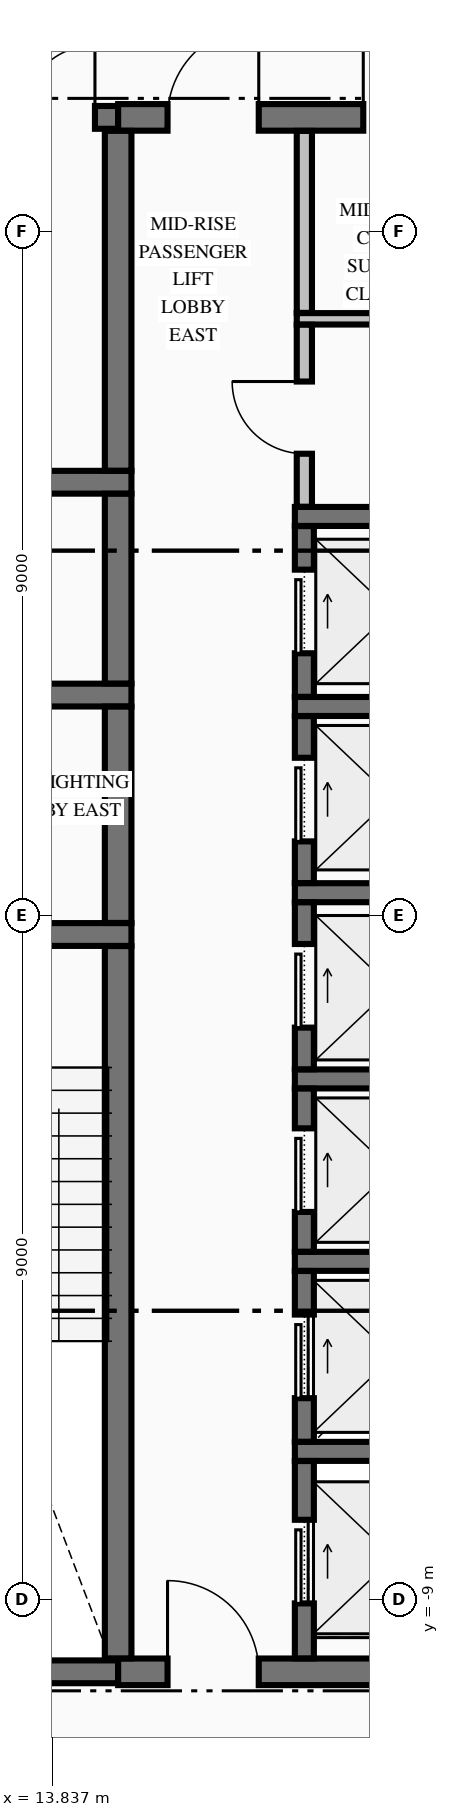
"""IFC4 building model, lengths in metres.
Left out: names, types, materials, properties, quantities, classifications, styles, units other than length and angle.
Written with IfcOpenShell. Run it as: python <this file> out.ifc"""

import sys

from ifc_helpers import new_model, si_unit, direction, frame, frame_2d, origin, place, context, subcontext, project, spatial, rectangle, extrude, element, fill, save


model = new_model("IFC4")
c1 = context("Model", 3, precision=1e-05, world=origin(), true_north=direction((0.0, 1.0)))
c2 = subcontext(c1, "Body", "Model", "MODEL_VIEW")
j1 = project(units=[si_unit("LENGTHUNIT", "METRE"), si_unit("PLANEANGLEUNIT", "RADIAN")], contexts=[c1])
p1 = place(None, origin())
s1 = spatial("IfcSite", under=j1, at=p1, CompositionType="ELEMENT")
p2 = place(p1, origin())
s2 = spatial("IfcBuilding", under=s1, at=p2, CompositionType="ELEMENT")
p3 = place(p2, frame((0.0, 0.0, 86.94)))
s3 = spatial("IfcBuildingStorey", under=s2, at=p3, CompositionType="ELEMENT", Elevation=86.94)
p4 = place(p3, frame((11.504, -9.95, 0.0), z_axis=(0.0, 0.0, 1.0), x_axis=(1.0, 0.0, 0.0)))
e1 = element("IfcWall", 1, at=p4, inside=s3, PredefinedType="SHEAR", context=c2, shape_type="SweptSolid", body=[
    extrude(rectangle(XDim=3.196, YDim=0.3, at=frame_2d((1.598, 0.0))), origin(), (0.0, 0.0, 1.0), 4.17),
])
p5 = place(p3, frame((14.7, -9.95, 0.0), z_axis=(0.0, 0.0, 1.0), x_axis=(1.0, 0.0, 0.0)))
e2 = element("IfcWall", 2, at=p5, inside=s3, PredefinedType="SHEAR", context=c2, shape_type="SweptSolid", body=[
    extrude(rectangle(XDim=4.796, YDim=0.35, at=frame_2d((2.398, 0.0))), origin(), (0.0, 0.0, 1.0), 4.17),
])
p6 = place(p5, frame((0.65, 0.0, 0.0)))
e3 = element("IfcOpeningElement", 3, at=p6, cuts=e2, PredefinedType="OPENING", context=c2, shape_type="SweptSolid", body=[
    extrude(rectangle(XDim=1.2, YDim=2.15, at=frame_2d((0.6, 1.075))), frame((0.0, 0.185, 0.0), z_axis=(0.0, -1.0, 0.0), x_axis=(1.0, 0.0, 0.0)), (0.0, 0.0, 1.0), 0.37),
])
for number, where, z_axis, x_axis in (
    (4, (17.025, -7.05, 0.0), (0.0, 0.0, 1.0), (1.0, 0.0, 0.0)),
    (5, (17.025, -4.55, 0.0), (0.0, 0.0, 1.0), (1.0, 0.0, 0.0)),
    (6, (17.025, -2.15, 0.0), (0.0, 0.0, 1.0), (1.0, 0.0, 0.0)),
):
    element("IfcWall", number, at=place(p3, frame(where, z_axis=z_axis, x_axis=x_axis)), inside=s3, PredefinedType="SOLIDWALL", context=c2, shape_type="SweptSolid", body=[
        extrude(rectangle(XDim=3.15, YDim=0.25, at=frame_2d((1.575, 0.0))), origin(), (0.0, 0.0, 1.0), 4.17),
    ])
p7 = place(p3, frame((11.504, -0.25, 0.0), z_axis=(0.0, 0.0, 1.0), x_axis=(1.0, 0.0, 0.0)))
e7 = element("IfcWall", 7, at=p7, inside=s3, PredefinedType="SHEAR", context=c2, shape_type="SweptSolid", body=[
    extrude(rectangle(XDim=3.371, YDim=0.3, at=frame_2d((1.686, 0.0))), origin(), (0.0, 0.0, 1.0), 4.17),
])
p8 = place(p7, frame((1.096, 0.0, 0.0)))
e8 = element("IfcOpeningElement", 8, at=p8, cuts=e7, PredefinedType="OPENING", context=c2, shape_type="SweptSolid", body=[
    extrude(rectangle(XDim=1.1, YDim=2.15, at=frame_2d((0.55, 1.075))), frame((0.0, 0.16, 0.0), z_axis=(0.0, -1.0, 0.0), x_axis=(1.0, 0.0, 0.0)), (0.0, 0.0, 1.0), 0.32),
])
p9 = place(p3, frame((17.025, 0.3, 0.0), z_axis=(0.0, 0.0, 1.0), x_axis=(1.0, 0.0, 0.0)))
e9 = element("IfcWall", 9, at=p9, inside=s3, PredefinedType="SOLIDWALL", context=c2, shape_type="SweptSolid", body=[
    extrude(rectangle(XDim=2.471, YDim=0.25, at=frame_2d((1.236, 0.0))), origin(), (0.0, 0.0, 1.0), 4.17),
])
p10 = place(p3, frame((17.025, 2.75, 0.0), z_axis=(0.0, 0.0, 1.0), x_axis=(1.0, 0.0, 0.0)))
e10 = element("IfcWall", 10, at=p10, inside=s3, PredefinedType="SOLIDWALL", context=c2, shape_type="SweptSolid", body=[
    extrude(rectangle(XDim=3.15, YDim=0.25, at=frame_2d((1.575, 0.0))), origin(), (0.0, 0.0, 1.0), 4.17),
])
p11 = place(p3, frame((10.85, 2.9, 0.0), z_axis=(0.0, 0.0, 1.0), x_axis=(1.0, 0.0, 0.0)))
e11 = element("IfcWall", 11, at=p11, inside=s3, PredefinedType="SHEAR", context=c2, shape_type="SweptSolid", body=[
    extrude(rectangle(XDim=4.025, YDim=0.3, at=frame_2d((2.012, 0.0))), origin(), (0.0, 0.0, 1.0), 4.17),
])
p12 = place(p11, frame((0.85, 0.0, 0.0)))
e12 = element("IfcOpeningElement", 12, at=p12, cuts=e11, PredefinedType="OPENING", context=c2, shape_type="SweptSolid", body=[
    extrude(rectangle(XDim=1.1, YDim=2.2, at=frame_2d((0.55, 1.1))), frame((0.0, 0.16, 0.0), z_axis=(0.0, -1.0, 0.0), x_axis=(1.0, 0.0, 0.0)), (0.0, 0.0, 1.0), 0.32),
])
p13 = place(p3, frame((17.025, 5.25, 0.0), z_axis=(0.0, 0.0, 1.0), x_axis=(1.0, 0.0, 0.0)))
e13 = element("IfcWall", 13, at=p13, inside=s3, PredefinedType="SOLIDWALL", context=c2, shape_type="SweptSolid", body=[
    extrude(rectangle(XDim=3.15, YDim=0.25, at=frame_2d((1.575, 0.0))), origin(), (0.0, 0.0, 1.0), 4.17),
])
p14 = place(p3, frame((10.85, 5.7, 0.0), z_axis=(0.0, 0.0, 1.0), x_axis=(1.0, 0.0, 0.0)))
e14 = element("IfcWall", 14, at=p14, inside=s3, PredefinedType="SHEAR", context=c2, shape_type="SweptSolid", body=[
    extrude(rectangle(XDim=4.025, YDim=0.3, at=frame_2d((2.012, 0.0))), origin(), (0.0, 0.0, 1.0), 4.17),
])
p15 = place(p3, frame((11.504, 10.5, 0.0), z_axis=(0.0, 0.0, 1.0), x_axis=(1.0, 0.0, 0.0)))
e15 = element("IfcWall", 15, at=p15, inside=s3, PredefinedType="SHEAR", context=c2, shape_type="SweptSolid", body=[
    extrude(rectangle(XDim=3.196, YDim=0.3, at=frame_2d((1.598, 0.0))), origin(), (0.0, 0.0, 1.0), 4.17),
])
p16 = place(p15, frame((1.941, 0.0, 0.0)))
e16 = element("IfcOpeningElement", 16, at=p16, cuts=e15, PredefinedType="OPENING", context=c2, shape_type="SweptSolid", body=[
    extrude(rectangle(XDim=0.95, YDim=2.15, at=frame_2d((0.475, 1.075))), frame((0.0, 0.16, 0.0), z_axis=(0.0, -1.0, 0.0), x_axis=(1.0, 0.0, 0.0)), (0.0, 0.0, 1.0), 0.32),
])
p17 = place(p3, frame((14.7, 10.5, 0.0), z_axis=(0.0, 0.0, 1.0), x_axis=(1.0, 0.0, 0.0)))
e17 = element("IfcWall", 17, at=p17, inside=s3, PredefinedType="SHEAR", context=c2, shape_type="SweptSolid", body=[
    extrude(rectangle(XDim=4.796, YDim=0.35, at=frame_2d((2.398, 0.0))), origin(), (0.0, 0.0, 1.0), 4.17),
])
p18 = place(p17, frame((0.65, 0.0, 0.0)))
e18 = element("IfcOpeningElement", 18, at=p18, cuts=e17, PredefinedType="OPENING", context=c2, shape_type="SweptSolid", body=[
    extrude(rectangle(XDim=1.2, YDim=2.15, at=frame_2d((0.6, 1.075))), frame((0.0, 0.185, 0.0), z_axis=(0.0, -1.0, 0.0), x_axis=(1.0, 0.0, 0.0)), (0.0, 0.0, 1.0), 0.37),
])
p19 = place(p17, frame((3.225, 0.0, 0.0)))
e19 = element("IfcOpeningElement", 19, at=p19, cuts=e17, PredefinedType="OPENING", context=c2, shape_type="SweptSolid", body=[
    extrude(rectangle(XDim=0.95, YDim=2.15, at=frame_2d((0.475, 1.075))), frame((0.0, 0.185, 0.0), z_axis=(0.0, -1.0, 0.0), x_axis=(1.0, 0.0, 0.0)), (0.0, 0.0, 1.0), 0.37),
])
p20 = place(p3, frame((17.05, 7.85, 0.0), z_axis=(0.0, 0.0, 1.0), x_axis=(1.0, 0.0, 0.0)))
e20 = element("IfcWall", 20, at=p20, inside=s3, PredefinedType="PARTITIONING", context=c2, shape_type="SweptSolid", body=[
    extrude(rectangle(XDim=2.772, YDim=0.15, at=frame_2d((1.386, 0.0))), origin(), (0.0, 0.0, 1.0), 4.17),
])
p21 = place(p3, frame((14.7, -9.773, 0.0), z_axis=(0.0, 0.0, 1.0), x_axis=(0.0, 1.0, 0.0)))
e21 = element("IfcWall", 21, at=p21, inside=s3, PredefinedType="SHEAR", context=c2, shape_type="SweptSolid", body=[
    extrude(rectangle(XDim=9.371, YDim=0.35, at=frame_2d((4.686, 0.0))), origin(), (0.0, 0.0, 1.0), 4.17),
])
p22 = place(p3, frame((14.7, -0.098, 0.0), z_axis=(0.0, 0.0, 1.0), x_axis=(0.0, 1.0, 0.0)))
e22 = element("IfcWall", 22, at=p22, inside=s3, PredefinedType="SHEAR", context=c2, shape_type="SweptSolid", body=[
    extrude(rectangle(XDim=2.846, YDim=0.35, at=frame_2d((1.423, 0.0))), origin(), (0.0, 0.0, 1.0), 4.17),
])
p23 = place(p3, frame((14.7, 3.052, 0.0), z_axis=(0.0, 0.0, 1.0), x_axis=(0.0, 1.0, 0.0)))
e23 = element("IfcWall", 23, at=p23, inside=s3, PredefinedType="SHEAR", context=c2, shape_type="SweptSolid", body=[
    extrude(rectangle(XDim=2.496, YDim=0.35, at=frame_2d((1.248, 0.0))), origin(), (0.0, 0.0, 1.0), 4.17),
])
p24 = place(p3, frame((14.7, 5.852, 0.0), z_axis=(0.0, 0.0, 1.0), x_axis=(0.0, 1.0, 0.0)))
e24 = element("IfcWall", 24, at=p24, inside=s3, PredefinedType="SHEAR", context=c2, shape_type="SweptSolid", body=[
    extrude(rectangle(XDim=4.471, YDim=0.35, at=frame_2d((2.235, 0.0))), origin(), (0.0, 0.0, 1.0), 4.17),
])
p25 = place(p3, frame((17.15, -9.773, 0.0), z_axis=(0.0, 0.0, 1.0), x_axis=(0.0, 1.0, 0.0)))
e25 = element("IfcWall", 25, at=p25, inside=s3, PredefinedType="SOLIDWALL", context=c2, shape_type="SweptSolid", body=[
    extrude(rectangle(XDim=2.596, YDim=0.25, at=frame_2d((1.298, 0.0))), origin(), (0.0, 0.0, 1.0), 4.17),
])
p26 = place(p25, frame((0.723, 0.0, 0.0)))
e26 = element("IfcOpeningElement", 26, at=p26, cuts=e25, PredefinedType="OPENING", context=c2, shape_type="SweptSolid", body=[
    extrude(rectangle(XDim=1.1, YDim=2.2, at=frame_2d((0.55, 1.1))), frame((0.0, 0.135, 0.0), z_axis=(0.0, -1.0, 0.0), x_axis=(1.0, 0.0, 0.0)), (0.0, 0.0, 1.0), 0.27),
])
p27 = place(p3, frame((17.15, -6.923, 0.0), z_axis=(0.0, 0.0, 1.0), x_axis=(0.0, 1.0, 0.0)))
e27 = element("IfcWall", 27, at=p27, inside=s3, PredefinedType="SOLIDWALL", context=c2, shape_type="SweptSolid", body=[
    extrude(rectangle(XDim=2.246, YDim=0.25, at=frame_2d((1.123, 0.0))), origin(), (0.0, 0.0, 1.0), 4.17),
])
p28 = place(p27, frame((0.573, 0.0, 0.0)))
e28 = element("IfcOpeningElement", 28, at=p28, cuts=e27, PredefinedType="OPENING", context=c2, shape_type="SweptSolid", body=[
    extrude(rectangle(XDim=1.1, YDim=2.2, at=frame_2d((0.55, 1.1))), frame((0.0, 0.135, 0.0), z_axis=(0.0, -1.0, 0.0), x_axis=(1.0, 0.0, 0.0)), (0.0, 0.0, 1.0), 0.27),
])
p29 = place(p3, frame((17.15, -4.423, 0.0), z_axis=(0.0, 0.0, 1.0), x_axis=(0.0, 1.0, 0.0)))
e29 = element("IfcWall", 29, at=p29, inside=s3, PredefinedType="SOLIDWALL", context=c2, shape_type="SweptSolid", body=[
    extrude(rectangle(XDim=2.146, YDim=0.25, at=frame_2d((1.073, 0.0))), origin(), (0.0, 0.0, 1.0), 4.17),
])
p30 = place(p29, frame((0.523, 0.0, 0.0)))
e30 = element("IfcOpeningElement", 30, at=p30, cuts=e29, PredefinedType="OPENING", context=c2, shape_type="SweptSolid", body=[
    extrude(rectangle(XDim=1.1, YDim=2.2, at=frame_2d((0.55, 1.1))), frame((0.0, 0.135, 0.0), z_axis=(0.0, -1.0, 0.0), x_axis=(1.0, 0.0, 0.0)), (0.0, 0.0, 1.0), 0.27),
])
p31 = place(p3, frame((17.15, -2.023, 0.0), z_axis=(0.0, 0.0, 1.0), x_axis=(0.0, 1.0, 0.0)))
e31 = element("IfcWall", 31, at=p31, inside=s3, PredefinedType="SOLIDWALL", context=c2, shape_type="SweptSolid", body=[
    extrude(rectangle(XDim=2.196, YDim=0.25, at=frame_2d((1.098, 0.0))), origin(), (0.0, 0.0, 1.0), 4.17),
])
p32 = place(p31, frame((0.548, 0.0, 0.0)))
e32 = element("IfcOpeningElement", 32, at=p32, cuts=e31, PredefinedType="OPENING", context=c2, shape_type="SweptSolid", body=[
    extrude(rectangle(XDim=1.1, YDim=2.2, at=frame_2d((0.55, 1.1))), frame((0.0, 0.135, 0.0), z_axis=(0.0, -1.0, 0.0), x_axis=(1.0, 0.0, 0.0)), (0.0, 0.0, 1.0), 0.27),
])
p33 = place(p3, frame((17.15, 0.427, 0.0), z_axis=(0.0, 0.0, 1.0), x_axis=(0.0, 1.0, 0.0)))
e33 = element("IfcWall", 33, at=p33, inside=s3, PredefinedType="SOLIDWALL", context=c2, shape_type="SweptSolid", body=[
    extrude(rectangle(XDim=2.196, YDim=0.25, at=frame_2d((1.098, 0.0))), origin(), (0.0, 0.0, 1.0), 4.17),
])
p34 = place(p33, frame((0.548, 0.0, 0.0)))
e34 = element("IfcOpeningElement", 34, at=p34, cuts=e33, PredefinedType="OPENING", context=c2, shape_type="SweptSolid", body=[
    extrude(rectangle(XDim=1.1, YDim=2.2, at=frame_2d((0.55, 1.1))), frame((0.0, 0.135, 0.0), z_axis=(0.0, -1.0, 0.0), x_axis=(1.0, 0.0, 0.0)), (0.0, 0.0, 1.0), 0.27),
])
p35 = place(p3, frame((17.15, 2.877, 0.0), z_axis=(0.0, 0.0, 1.0), x_axis=(0.0, 1.0, 0.0)))
e35 = element("IfcWall", 35, at=p35, inside=s3, PredefinedType="SOLIDWALL", context=c2, shape_type="SweptSolid", body=[
    extrude(rectangle(XDim=2.246, YDim=0.25, at=frame_2d((1.123, 0.0))), origin(), (0.0, 0.0, 1.0), 4.17),
])
p36 = place(p35, frame((0.573, 0.0, 0.0)))
e36 = element("IfcOpeningElement", 36, at=p36, cuts=e35, PredefinedType="OPENING", context=c2, shape_type="SweptSolid", body=[
    extrude(rectangle(XDim=1.1, YDim=2.2, at=frame_2d((0.55, 1.1))), frame((0.0, 0.135, 0.0), z_axis=(0.0, -1.0, 0.0), x_axis=(1.0, 0.0, 0.0)), (0.0, 0.0, 1.0), 0.27),
])
p37 = place(p3, frame((17.15, 5.378, 0.0), z_axis=(0.0, 0.0, 1.0), x_axis=(0.0, 1.0, 0.0)))
e37 = element("IfcWall", 37, at=p37, inside=s3, PredefinedType="PARTITIONING", context=c2, shape_type="SweptSolid", body=[
    extrude(rectangle(XDim=2.394, YDim=0.2, at=frame_2d((1.197, 0.0))), origin(), (0.0, 0.0, 1.0), 4.17),
])
p38 = place(p37, frame((0.697, 0.0, 0.0)))
e38 = element("IfcOpeningElement", 38, at=p38, cuts=e37, PredefinedType="OPENING", context=c2, shape_type="SweptSolid", body=[
    extrude(rectangle(XDim=0.95, YDim=2.15, at=frame_2d((0.475, 1.075))), frame((0.0, 0.11, 0.0), z_axis=(0.0, -1.0, 0.0), x_axis=(1.0, 0.0, 0.0)), (0.0, 0.0, 1.0), 0.22),
])
p39 = place(p3, frame((17.15, 7.928, 0.0), z_axis=(0.0, 0.0, 1.0), x_axis=(0.0, 1.0, 0.0)))
e39 = element("IfcWall", 39, at=p39, inside=s3, PredefinedType="PARTITIONING", context=c2, shape_type="SweptSolid", body=[
    extrude(rectangle(XDim=2.394, YDim=0.2, at=frame_2d((1.197, 0.0))), origin(), (0.0, 0.0, 1.0), 4.17),
])
p40 = place(p16, origin())
e40 = element("IfcDoor", 40, at=p40, inside=s3, OperationType="SINGLE_SWING_RIGHT", PredefinedType="DOOR", context=c2, shape_type="SweptSolid", body=[
    extrude(rectangle(XDim=0.95, YDim=2.15, at=frame_2d((0.475, 1.075))), frame((0.0, 0.025, 0.0), z_axis=(0.0, -1.0, 0.0), x_axis=(1.0, 0.0, 0.0)), (0.0, 0.0, 1.0), 0.05),
])
fill(e16, e40)
p41 = place(p26, origin())
e41 = element("IfcDoor", 41, at=p41, inside=s3, OperationType="SLIDING_TO_RIGHT", PredefinedType="DOOR", context=c2, shape_type="SweptSolid", body=[
    extrude(rectangle(XDim=1.1, YDim=2.2, at=frame_2d((0.55, 1.1))), frame((0.0, 0.025, 0.0), z_axis=(0.0, -1.0, 0.0), x_axis=(1.0, 0.0, 0.0)), (0.0, 0.0, 1.0), 0.05),
])
fill(e26, e41)
p42 = place(p28, origin())
e42 = element("IfcDoor", 42, at=p42, inside=s3, OperationType="SLIDING_TO_RIGHT", PredefinedType="DOOR", context=c2, shape_type="SweptSolid", body=[
    extrude(rectangle(XDim=1.1, YDim=2.2, at=frame_2d((0.55, 1.1))), frame((0.0, 0.025, 0.0), z_axis=(0.0, -1.0, 0.0), x_axis=(1.0, 0.0, 0.0)), (0.0, 0.0, 1.0), 0.05),
])
fill(e28, e42)
p43 = place(p30, origin())
e43 = element("IfcDoor", 43, at=p43, inside=s3, OperationType="SLIDING_TO_RIGHT", PredefinedType="DOOR", context=c2, shape_type="SweptSolid", body=[
    extrude(rectangle(XDim=1.1, YDim=2.2, at=frame_2d((0.55, 1.1))), frame((0.0, 0.025, 0.0), z_axis=(0.0, -1.0, 0.0), x_axis=(1.0, 0.0, 0.0)), (0.0, 0.0, 1.0), 0.05),
])
fill(e30, e43)
p44 = place(p32, origin())
e44 = element("IfcDoor", 44, at=p44, inside=s3, OperationType="SLIDING_TO_RIGHT", PredefinedType="DOOR", context=c2, shape_type="SweptSolid", body=[
    extrude(rectangle(XDim=1.1, YDim=2.2, at=frame_2d((0.55, 1.1))), frame((0.0, 0.025, 0.0), z_axis=(0.0, -1.0, 0.0), x_axis=(1.0, 0.0, 0.0)), (0.0, 0.0, 1.0), 0.05),
])
fill(e32, e44)
p45 = place(p34, origin())
e45 = element("IfcDoor", 45, at=p45, inside=s3, OperationType="SLIDING_TO_RIGHT", PredefinedType="DOOR", context=c2, shape_type="SweptSolid", body=[
    extrude(rectangle(XDim=1.1, YDim=2.2, at=frame_2d((0.55, 1.1))), frame((0.0, 0.025, 0.0), z_axis=(0.0, -1.0, 0.0), x_axis=(1.0, 0.0, 0.0)), (0.0, 0.0, 1.0), 0.05),
])
fill(e34, e45)
p46 = place(p36, origin())
e46 = element("IfcDoor", 46, at=p46, inside=s3, OperationType="SLIDING_TO_RIGHT", PredefinedType="DOOR", context=c2, shape_type="SweptSolid", body=[
    extrude(rectangle(XDim=1.1, YDim=2.2, at=frame_2d((0.55, 1.1))), frame((0.0, 0.025, 0.0), z_axis=(0.0, -1.0, 0.0), x_axis=(1.0, 0.0, 0.0)), (0.0, 0.0, 1.0), 0.05),
])
fill(e36, e46)
p47 = place(p6, origin())
e47 = element("IfcDoor", 47, at=p47, inside=s3, OperationType="SINGLE_SWING_LEFT", PredefinedType="DOOR", context=c2, shape_type="SweptSolid", body=[
    extrude(rectangle(XDim=1.2, YDim=2.15, at=frame_2d((0.6, 1.075))), frame((0.0, 0.025, 0.0), z_axis=(0.0, -1.0, 0.0), x_axis=(1.0, 0.0, 0.0)), (0.0, 0.0, 1.0), 0.05),
])
fill(e3, e47)
p48 = place(p18, origin())
e48 = element("IfcDoor", 48, at=p48, inside=s3, OperationType="SINGLE_SWING_RIGHT", PredefinedType="DOOR", context=c2, shape_type="SweptSolid", body=[
    extrude(rectangle(XDim=1.2, YDim=2.15, at=frame_2d((0.6, 1.075))), frame((0.0, 0.025, 0.0), z_axis=(0.0, -1.0, 0.0), x_axis=(1.0, 0.0, 0.0)), (0.0, 0.0, 1.0), 0.05),
])
fill(e18, e48)
p49 = place(p19, origin())
e49 = element("IfcDoor", 49, at=p49, inside=s3, OperationType="SINGLE_SWING_LEFT", PredefinedType="DOOR", context=c2, shape_type="SweptSolid", body=[
    extrude(rectangle(XDim=0.95, YDim=2.15, at=frame_2d((0.475, 1.075))), frame((0.0, 0.025, 0.0), z_axis=(0.0, -1.0, 0.0), x_axis=(1.0, 0.0, 0.0)), (0.0, 0.0, 1.0), 0.05),
])
fill(e19, e49)
p50 = place(p38, origin())
e50 = element("IfcDoor", 50, at=p50, inside=s3, OperationType="SINGLE_SWING_RIGHT", PredefinedType="DOOR", context=c2, shape_type="SweptSolid", body=[
    extrude(rectangle(XDim=0.95, YDim=2.15, at=frame_2d((0.475, 1.075))), frame((0.0, 0.025, 0.0), z_axis=(0.0, -1.0, 0.0), x_axis=(1.0, 0.0, 0.0)), (0.0, 0.0, 1.0), 0.05),
])
fill(e38, e50)
save(model, sys.argv[1])
